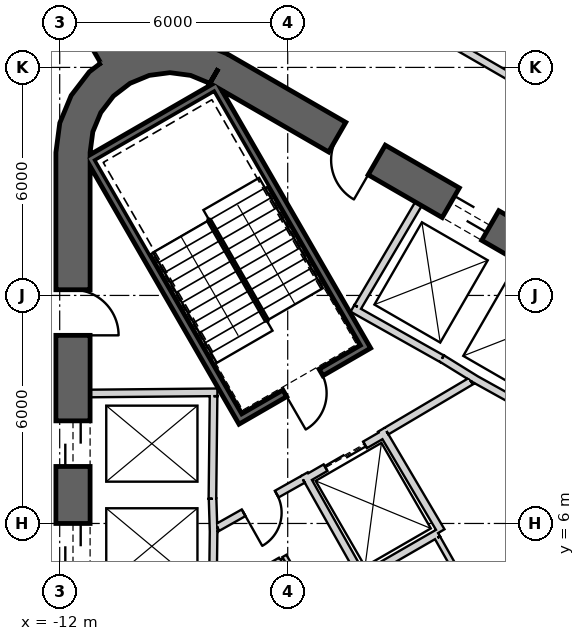
"""IFC4 building model, lengths in metres.
Left out: names, types, materials, properties, quantities, classifications, styles, units other than length and angle.
Written with IfcOpenShell. Run it as: python <this file> out.ifc"""

import sys

from ifc_helpers import new_model, si_unit, direction, frame, frame_2d, origin, place, context, subcontext, project, spatial, polyline, rectangle, outline, extrude, element, fill, save


model = new_model("IFC4")
c1 = context("Model", 3, precision=1e-05, world=origin(), true_north=direction((0.0, 1.0)))
c2 = subcontext(c1, "Body", "Model", "MODEL_VIEW")
j1 = project(units=[si_unit("LENGTHUNIT", "METRE"), si_unit("PLANEANGLEUNIT", "RADIAN")], contexts=[c1])
p1 = place(None, origin())
s1 = spatial("IfcSite", under=j1, at=p1, CompositionType="ELEMENT")
p2 = place(p1, origin())
s2 = spatial("IfcBuilding", under=s1, at=p2, CompositionType="ELEMENT")
p3 = place(p2, frame((0.0, 0.0, 82.4)))
s3 = spatial("IfcBuildingStorey", under=s2, at=p3, CompositionType="ELEMENT", Elevation=82.4)
p4 = place(p3, frame((19.475, 2.208, 0.0), z_axis=(0.0, 0.0, 1.0), x_axis=(-0.866028369851, 0.499994862586, 0.0)))
e1 = element("IfcWall", 1, at=p4, inside=s3, PredefinedType="SHEAR", context=c2, shape_type="SweptSolid", body=[
    extrude(rectangle(XDim=31.523, YDim=0.9, at=frame_2d((15.762, 0.0))), origin(), (0.0, 0.0, 1.0), 4.1),
])
p5 = place(p4, frame((7.062, 0.0, 0.0)))
e2 = element("IfcOpeningElement", 2, at=p5, cuts=e1, PredefinedType="OPENING", context=c2, shape_type="SweptSolid", body=[
    extrude(rectangle(XDim=1.2, YDim=2.4, at=frame_2d((0.6, 1.2))), frame((0.0, 0.46, 0.0), z_axis=(0.0, -1.0, 0.0), x_axis=(1.0, 0.0, 0.0)), (0.0, 0.0, 1.0), 0.92),
])
p6 = place(p4, frame((9.762, 0.0, 0.0)))
e3 = element("IfcOpeningElement", 3, at=p6, cuts=e1, PredefinedType="OPENING", context=c2, shape_type="SweptSolid", body=[
    extrude(rectangle(XDim=1.2, YDim=2.4, at=frame_2d((0.6, 1.2))), frame((0.0, 0.46, 0.0), z_axis=(0.0, -1.0, 0.0), x_axis=(1.0, 0.0, 0.0)), (0.0, 0.0, 1.0), 0.92),
])
p7 = place(p4, frame((12.462, 0.0, 0.0)))
e4 = element("IfcOpeningElement", 4, at=p7, cuts=e1, PredefinedType="OPENING", context=c2, shape_type="SweptSolid", body=[
    extrude(rectangle(XDim=1.2, YDim=2.4, at=frame_2d((0.6, 1.2))), frame((0.0, 0.46, 0.0), z_axis=(0.0, -1.0, 0.0), x_axis=(1.0, 0.0, 0.0)), (0.0, 0.0, 1.0), 0.92),
])
p8 = place(p4, frame((15.162, 0.0, 0.0)))
e5 = element("IfcOpeningElement", 5, at=p8, cuts=e1, PredefinedType="OPENING", context=c2, shape_type="SweptSolid", body=[
    extrude(rectangle(XDim=1.2, YDim=2.4, at=frame_2d((0.6, 1.2))), frame((0.0, 0.46, 0.0), z_axis=(0.0, -1.0, 0.0), x_axis=(1.0, 0.0, 0.0)), (0.0, 0.0, 1.0), 0.92),
])
p9 = place(p4, frame((17.862, 0.0, 0.0)))
e6 = element("IfcOpeningElement", 6, at=p9, cuts=e1, PredefinedType="OPENING", context=c2, shape_type="SweptSolid", body=[
    extrude(rectangle(XDim=1.2, YDim=2.4, at=frame_2d((0.6, 1.2))), frame((0.0, 0.46, 0.0), z_axis=(0.0, -1.0, 0.0), x_axis=(1.0, 0.0, 0.0)), (0.0, 0.0, 1.0), 0.92),
])
p10 = place(p4, frame((20.562, 0.0, 0.0)))
e7 = element("IfcOpeningElement", 7, at=p10, cuts=e1, PredefinedType="OPENING", context=c2, shape_type="SweptSolid", body=[
    extrude(rectangle(XDim=1.2, YDim=2.4, at=frame_2d((0.6, 1.2))), frame((0.0, 0.46, 0.0), z_axis=(0.0, -1.0, 0.0), x_axis=(1.0, 0.0, 0.0)), (0.0, 0.0, 1.0), 0.92),
])
p11 = place(p4, frame((23.262, 0.0, 0.0)))
e8 = element("IfcOpeningElement", 8, at=p11, cuts=e1, PredefinedType="OPENING", context=c2, shape_type="SweptSolid", body=[
    extrude(rectangle(XDim=1.2, YDim=2.4, at=frame_2d((0.6, 1.2))), frame((0.0, 0.46, 0.0), z_axis=(0.0, -1.0, 0.0), x_axis=(1.0, 0.0, 0.0)), (0.0, 0.0, 1.0), 0.92),
])
p12 = place(p4, frame((3.612, 0.0, 0.0)))
e9 = element("IfcOpeningElement", 9, at=p12, cuts=e1, PredefinedType="OPENING", context=c2, shape_type="SweptSolid", body=[
    extrude(rectangle(XDim=1.2, YDim=2.4, at=frame_2d((0.6, 1.2))), frame((0.0, 0.46, 0.0), z_axis=(0.0, -1.0, 0.0), x_axis=(1.0, 0.0, 0.0)), (0.0, 0.0, 1.0), 0.92),
])
p13 = place(p4, frame((26.712, 0.0, 0.0)))
e10 = element("IfcOpeningElement", 10, at=p13, cuts=e1, PredefinedType="OPENING", context=c2, shape_type="SweptSolid", body=[
    extrude(rectangle(XDim=1.2, YDim=2.4, at=frame_2d((0.6, 1.2))), frame((0.0, 0.46, 0.0), z_axis=(0.0, -1.0, 0.0), x_axis=(1.0, 0.0, 0.0)), (0.0, 0.0, 1.0), 0.92),
])
p14 = place(p3, frame((-11.65, 15.762, 0.0), z_axis=(0.0, 0.0, 1.0), x_axis=(0.0, -1.0, 0.0)))
e11 = element("IfcWall", 11, at=p14, inside=s3, PredefinedType="SHEAR", context=c2, shape_type="SweptSolid", body=[
    extrude(rectangle(XDim=31.523, YDim=0.9, at=frame_2d((15.762, 0.0))), origin(), (0.0, 0.0, 1.0), 4.1),
])
p15 = place(p14, frame((7.062, 0.0, 0.0)))
e12 = element("IfcOpeningElement", 12, at=p15, cuts=e11, PredefinedType="OPENING", context=c2, shape_type="SweptSolid", body=[
    extrude(rectangle(XDim=1.2, YDim=2.4, at=frame_2d((0.6, 1.2))), frame((0.0, 0.46, 0.0), z_axis=(0.0, -1.0, 0.0), x_axis=(1.0, 0.0, 0.0)), (0.0, 0.0, 1.0), 0.92),
])
p16 = place(p14, frame((9.762, 0.0, 0.0)))
e13 = element("IfcOpeningElement", 13, at=p16, cuts=e11, PredefinedType="OPENING", context=c2, shape_type="SweptSolid", body=[
    extrude(rectangle(XDim=1.2, YDim=2.4, at=frame_2d((0.6, 1.2))), frame((0.0, 0.46, 0.0), z_axis=(0.0, -1.0, 0.0), x_axis=(1.0, 0.0, 0.0)), (0.0, 0.0, 1.0), 0.92),
])
p17 = place(p14, frame((12.462, 0.0, 0.0)))
e14 = element("IfcOpeningElement", 14, at=p17, cuts=e11, PredefinedType="OPENING", context=c2, shape_type="SweptSolid", body=[
    extrude(rectangle(XDim=1.2, YDim=2.4, at=frame_2d((0.6, 1.2))), frame((0.0, 0.46, 0.0), z_axis=(0.0, -1.0, 0.0), x_axis=(1.0, 0.0, 0.0)), (0.0, 0.0, 1.0), 0.92),
])
p18 = place(p14, frame((15.162, 0.0, 0.0)))
e15 = element("IfcOpeningElement", 15, at=p18, cuts=e11, PredefinedType="OPENING", context=c2, shape_type="SweptSolid", body=[
    extrude(rectangle(XDim=1.2, YDim=2.4, at=frame_2d((0.6, 1.2))), frame((0.0, 0.46, 0.0), z_axis=(0.0, -1.0, 0.0), x_axis=(1.0, 0.0, 0.0)), (0.0, 0.0, 1.0), 0.92),
])
p19 = place(p14, frame((17.862, 0.0, 0.0)))
e16 = element("IfcOpeningElement", 16, at=p19, cuts=e11, PredefinedType="OPENING", context=c2, shape_type="SweptSolid", body=[
    extrude(rectangle(XDim=1.2, YDim=2.4, at=frame_2d((0.6, 1.2))), frame((0.0, 0.46, 0.0), z_axis=(0.0, -1.0, 0.0), x_axis=(1.0, 0.0, 0.0)), (0.0, 0.0, 1.0), 0.92),
])
p20 = place(p14, frame((20.562, 0.0, 0.0)))
e17 = element("IfcOpeningElement", 17, at=p20, cuts=e11, PredefinedType="OPENING", context=c2, shape_type="SweptSolid", body=[
    extrude(rectangle(XDim=1.2, YDim=2.4, at=frame_2d((0.6, 1.2))), frame((0.0, 0.46, 0.0), z_axis=(0.0, -1.0, 0.0), x_axis=(1.0, 0.0, 0.0)), (0.0, 0.0, 1.0), 0.92),
])
p21 = place(p14, frame((23.262, 0.0, 0.0)))
e18 = element("IfcOpeningElement", 18, at=p21, cuts=e11, PredefinedType="OPENING", context=c2, shape_type="SweptSolid", body=[
    extrude(rectangle(XDim=1.2, YDim=2.4, at=frame_2d((0.6, 1.2))), frame((0.0, 0.46, 0.0), z_axis=(0.0, -1.0, 0.0), x_axis=(1.0, 0.0, 0.0)), (0.0, 0.0, 1.0), 0.92),
])
p22 = place(p14, frame((3.612, 0.0, 0.0)))
e19 = element("IfcOpeningElement", 19, at=p22, cuts=e11, PredefinedType="OPENING", context=c2, shape_type="SweptSolid", body=[
    extrude(rectangle(XDim=1.2, YDim=2.4, at=frame_2d((0.6, 1.2))), frame((0.0, 0.46, 0.0), z_axis=(0.0, -1.0, 0.0), x_axis=(1.0, 0.0, 0.0)), (0.0, 0.0, 1.0), 0.92),
])
p23 = place(p14, frame((26.712, 0.0, 0.0)))
e20 = element("IfcOpeningElement", 20, at=p23, cuts=e11, PredefinedType="OPENING", context=c2, shape_type="SweptSolid", body=[
    extrude(rectangle(XDim=1.2, YDim=2.4, at=frame_2d((0.6, 1.2))), frame((0.0, 0.46, 0.0), z_axis=(0.0, -1.0, 0.0), x_axis=(1.0, 0.0, 0.0)), (0.0, 0.0, 1.0), 0.92),
])
p24 = place(p3, origin())
e21 = element("IfcWall", 21, at=p24, inside=s3, PredefinedType="SHEAR", context=c2, shape_type="SweptSolid", body=[
    extrude(outline(polyline([(-7.6, 18.36), (-8.323, 18.659), (-9.1, 18.762), (-9.876, 18.659), (-10.6, 18.36), (-11.221, 17.883), (-11.698, 17.262), (-11.998, 16.538), (-12.1, 15.762), (-11.2, 15.762), (-11.128, 16.305), (-10.919, 16.812), (-10.585, 17.247), (-10.15, 17.58), (-9.644, 17.79), (-9.1, 17.862), (-8.556, 17.79), (-8.05, 17.58), (-7.6, 18.36)])), origin(), (0.0, 0.0, 1.0), 4.1),
])
p25 = place(p3, frame((-10.575, 18.316, 0.0), z_axis=(0.0, 0.0, 1.0), x_axis=(-0.499995223427, 0.866028161523, 0.0)))
e22 = element("IfcWall", 22, at=p25, inside=s3, PredefinedType="SHEAR", context=c2, shape_type="SweptSolid", body=[
    extrude(rectangle(XDim=13.455, YDim=0.8, at=frame_2d((6.728, 0.0))), origin(), (0.0, 0.0, 1.0), 4.1),
])
p26 = place(p25, frame((0.7, 0.0, 0.0)))
e23 = element("IfcOpeningElement", 23, at=p26, cuts=e22, PredefinedType="OPENING", context=c2, shape_type="SweptSolid", body=[
    extrude(rectangle(XDim=1.4, YDim=2.4, at=frame_2d((0.7, 1.2))), frame((0.0, 0.41, 0.0), z_axis=(0.0, -1.0, 0.0), x_axis=(1.0, 0.0, 0.0)), (0.0, 0.0, 1.0), 0.82),
])
p27 = place(p3, frame((-11.2, 9.42, 0.0), z_axis=(0.0, 0.0, 1.0), x_axis=(0.999957167047, 0.009255488683, 0.0)))
e24 = element("IfcWall", 24, at=p27, inside=s3, PredefinedType="PLUMBINGWALL", context=c2, shape_type="SweptSolid", body=[
    extrude(rectangle(XDim=3.35, YDim=0.2, at=frame_2d((1.675, 0.0))), origin(), (0.0, 0.0, 1.0), 3.8),
])
p28 = place(p3, frame((-7.951, 9.35, 0.0), z_axis=(0.0, 0.0, 1.0), x_axis=(-0.011120469654, -0.999938165666, 0.0)))
e25 = element("IfcWall", 25, at=p28, inside=s3, PredefinedType="PLUMBINGWALL", context=c2, shape_type="SweptSolid", body=[
    extrude(rectangle(XDim=2.7, YDim=0.2, at=frame_2d((1.35, 0.0))), origin(), (0.0, 0.0, 1.0), 3.8),
])
p29 = place(p3, frame((-7.977, 6.65, 0.0), z_axis=(0.0, 0.0, 1.0), x_axis=(0.030861509705, -0.999523670164, 0.0)))
e26 = element("IfcWall", 26, at=p29, inside=s3, PredefinedType="PLUMBINGWALL", context=c2, shape_type="SweptSolid", body=[
    extrude(rectangle(XDim=0.878, YDim=0.2, at=frame_2d((0.439, 0.0))), origin(), (0.0, 0.0, 1.0), 3.8),
])
p30 = place(p3, frame((-7.949, 5.895, 0.0), z_axis=(0.0, 0.0, 1.0), x_axis=(-0.012042535896, -0.999927486035, 0.0)))
e27 = element("IfcWall", 27, at=p30, inside=s3, PredefinedType="PLUMBINGWALL", context=c2, shape_type="SweptSolid", body=[
    extrude(rectangle(XDim=1.845, YDim=0.2, at=frame_2d((0.922, 0.0))), origin(), (0.0, 0.0, 1.0), 3.8),
])
p31 = place(p3, frame((-1.941, 10.339, 0.0), z_axis=(0.0, 0.0, 1.0), x_axis=(0.850216889117, -0.526432561171, 0.0)))
e28 = element("IfcWall", 28, at=p31, inside=s3, PredefinedType="PLUMBINGWALL", context=c2, shape_type="SweptSolid", body=[
    extrude(rectangle(XDim=1.078, YDim=0.2, at=frame_2d((0.539, 0.0))), origin(), (0.0, 0.0, 1.0), 3.8),
])
p32 = place(p3, frame((0.483, 8.936, 0.0), z_axis=(0.0, 0.0, 1.0), x_axis=(-0.874269620932, 0.485440655401, 0.0)))
e29 = element("IfcWall", 29, at=p32, inside=s3, PredefinedType="PLUMBINGWALL", context=c2, shape_type="SweptSolid", body=[
    extrude(rectangle(XDim=1.845, YDim=0.2, at=frame_2d((0.922, 0.0))), origin(), (0.0, 0.0, 1.0), 3.8),
])
p33 = place(p3, frame((-4.296, 11.659, 0.0), z_axis=(0.0, 0.0, 1.0), x_axis=(0.871534483978, -0.490334215854, 0.0)))
e30 = element("IfcWall", 30, at=p33, inside=s3, PredefinedType="PLUMBINGWALL", context=c2, shape_type="SweptSolid", body=[
    extrude(rectangle(XDim=2.7, YDim=0.2, at=frame_2d((1.35, 0.0))), origin(), (0.0, 0.0, 1.0), 3.8),
])
p34 = place(p3, frame((-4.158, 11.696, 0.0), z_axis=(0.0, 0.0, 1.0), x_axis=(0.508018930956, 0.861345903683, 0.0)))
e31 = element("IfcWall", 31, at=p34, inside=s3, PredefinedType="PLUMBINGWALL", context=c2, shape_type="SweptSolid", body=[
    extrude(rectangle(XDim=3.15, YDim=0.2, at=frame_2d((1.575, 0.0))), origin(), (0.0, 0.0, 1.0), 3.8),
])
p35 = place(p3, frame((-11.245, 15.678, -0.3), z_axis=(0.0, 0.0, 1.0), x_axis=(0.499977274689, -0.866038523851, 0.0)))
e32 = element("IfcWall", 32, at=p35, inside=s3, PredefinedType="SHEAR", context=c2, shape_type="SweptSolid", body=[
    extrude(rectangle(XDim=8.1, YDim=0.2, at=frame_2d((4.05, 0.0))), origin(), (0.0, 0.0, 1.0), 4.1),
])
p36 = place(p3, frame((-7.818, 17.541, -0.3), z_axis=(0.0, 0.0, 1.0), x_axis=(-0.866044365799, -0.499967155389, 0.0)))
e33 = element("IfcWall", 33, at=p36, inside=s3, PredefinedType="SHEAR", context=c2, shape_type="SweptSolid", body=[
    extrude(rectangle(XDim=3.8, YDim=0.2, at=frame_2d((1.9, 0.0))), origin(), (0.0, 0.0, 1.0), 4.1),
])
p37 = place(p3, frame((-7.854, 17.405, -0.3), z_axis=(0.0, 0.0, 1.0), x_axis=(0.499997992926, -0.866026562566, 0.0)))
e34 = element("IfcWall", 34, at=p37, inside=s3, PredefinedType="SHEAR", context=c2, shape_type="SweptSolid", body=[
    extrude(rectangle(XDim=7.9, YDim=0.2, at=frame_2d((3.95, 0.0))), origin(), (0.0, 0.0, 1.0), 4.1),
])
p38 = place(p3, frame((-7.159, 8.8, -0.3), z_axis=(0.0, 0.0, 1.0), x_axis=(0.866047807691, 0.499961193289, 0.0)))
e35 = element("IfcWall", 35, at=p38, inside=s3, PredefinedType="SHEAR", context=c2, shape_type="SweptSolid", body=[
    extrude(rectangle(XDim=3.6, YDim=0.2, at=frame_2d((1.8, 0.0))), origin(), (0.0, 0.0, 1.0), 4.1),
])
p39 = place(p38, frame((1.25, 0.0, 0.3)))
e36 = element("IfcOpeningElement", 36, at=p39, cuts=e35, PredefinedType="OPENING", context=c2, shape_type="SweptSolid", body=[
    extrude(rectangle(XDim=1.1, YDim=2.1, at=frame_2d((0.55, 1.05))), frame((0.0, 0.11, 0.0), z_axis=(0.0, -1.0, 0.0), x_axis=(1.0, 0.0, 0.0)), (0.0, 0.0, 1.0), 0.22),
])
p40 = place(p3, frame((-5.524, 7.168, 0.0), z_axis=(0.0, 0.0, 1.0), x_axis=(0.866024647952, 0.500001309137, 0.0)))
e37 = element("IfcWall", 37, at=p40, inside=s3, PredefinedType="PLUMBINGWALL", context=c2, shape_type="SweptSolid", body=[
    extrude(rectangle(XDim=2.4, YDim=0.2, at=frame_2d((1.2, 0.0))), origin(), (0.0, 0.0, 1.0), 3.8),
])
p41 = place(p40, frame((0.6, 0.0, 0.0)))
e38 = element("IfcOpeningElement", 38, at=p41, cuts=e37, PredefinedType="OPENING", context=c2, shape_type="SweptSolid", body=[
    extrude(rectangle(XDim=1.2, YDim=2.4, at=frame_2d((0.6, 1.2))), frame((0.0, 0.11, 0.0), z_axis=(0.0, -1.0, 0.0), x_axis=(1.0, 0.0, 0.0)), (0.0, 0.0, 1.0), 0.22),
])
p42 = place(p3, frame((-3.538, 8.465, 0.0), z_axis=(0.0, 0.0, 1.0), x_axis=(0.508647062354, -0.860975125052, 0.0)))
e39 = element("IfcWall", 39, at=p42, inside=s3, PredefinedType="PLUMBINGWALL", context=c2, shape_type="SweptSolid", body=[
    extrude(rectangle(XDim=3.1, YDim=0.2, at=frame_2d((1.55, 0.0))), origin(), (0.0, 0.0, 1.0), 3.8),
])
p43 = place(p3, frame((-2.043, 5.748, 0.0), z_axis=(0.0, 0.0, 1.0), x_axis=(-0.866035096217, -0.499983211839, 0.0)))
e40 = element("IfcWall", 40, at=p43, inside=s3, PredefinedType="PLUMBINGWALL", context=c2, shape_type="SweptSolid", body=[
    extrude(rectangle(XDim=2.404, YDim=0.2, at=frame_2d((1.202, 0.0))), origin(), (0.0, 0.0, 1.0), 3.8),
])
p44 = place(p3, frame((-5.562, 7.296, 0.0), z_axis=(0.0, 0.0, 1.0), x_axis=(0.49134651263, -0.870964180966, 0.0)))
e41 = element("IfcWall", 41, at=p44, inside=s3, PredefinedType="PLUMBINGWALL", context=c2, shape_type="SweptSolid", body=[
    extrude(rectangle(XDim=3.0, YDim=0.2, at=frame_2d((1.5, 0.0))), origin(), (0.0, 0.0, 1.0), 3.8),
])
p45 = place(p3, frame((-1.18, 9.744, 0.0), z_axis=(0.0, 0.0, 1.0), x_axis=(-0.860615607571, -0.509255118781, 0.0)))
e42 = element("IfcWall", 42, at=p45, inside=s3, PredefinedType="PARTITIONING", context=c2, shape_type="SweptSolid", body=[
    extrude(rectangle(XDim=2.581, YDim=0.2, at=frame_2d((1.29, 0.0))), origin(), (0.0, 0.0, 1.0), 3.8),
])
p46 = place(p3, frame((-5.6, 7.16, 0.0), z_axis=(0.0, 0.0, 1.0), x_axis=(-0.871363259478, -0.490638431059, 0.0)))
e43 = element("IfcWall", 43, at=p46, inside=s3, PredefinedType="PARTITIONING", context=c2, shape_type="SweptSolid", body=[
    extrude(rectangle(XDim=2.581, YDim=0.2, at=frame_2d((1.291, 0.0))), origin(), (0.0, 0.0, 1.0), 3.8),
])
p47 = place(p46, frame((0.791, 0.0, 0.0)))
e44 = element("IfcOpeningElement", 44, at=p47, cuts=e43, PredefinedType="OPENING", context=c2, shape_type="SweptSolid", body=[
    extrude(rectangle(XDim=1.0, YDim=2.1, at=frame_2d((0.5, 1.05))), frame((0.0, 0.11, 0.0), z_axis=(0.0, -1.0, 0.0), x_axis=(1.0, 0.0, 0.0)), (0.0, 0.0, 1.0), 0.22),
])
p48 = place(p3, frame((-2.059, 5.624, 0.0), z_axis=(0.0, 0.0, 1.0), x_axis=(0.49265005812, -0.870227510617, 0.0)))
e45 = element("IfcWall", 45, at=p48, inside=s3, PredefinedType="PLUMBINGWALL", context=c2, shape_type="SweptSolid", body=[
    extrude(rectangle(XDim=3.365, YDim=0.15, at=frame_2d((1.683, 0.0))), origin(), (0.0, 0.0, 1.0), 3.8),
])
p49 = place(p3, frame((-6.231, 5.062, 0.0), z_axis=(0.0, 0.0, 1.0), x_axis=(0.0, -1.0, 0.0)))
e46 = element("IfcWall", 46, at=p49, inside=s3, PredefinedType="PARTITIONING", context=c2, shape_type="SweptSolid", body=[
    extrude(rectangle(XDim=10.125, YDim=0.12, at=frame_2d((5.062, 0.0))), origin(), (0.0, 0.0, 1.0), 3.8),
])
p50 = place(p3, frame((-6.201, 5.046, 0.0), z_axis=(0.0, 0.0, 1.0), x_axis=(-0.867071050325, -0.498184497639, 0.0)))
e47 = element("IfcWall", 47, at=p50, inside=s3, PredefinedType="PARTITIONING", context=c2, shape_type="SweptSolid", body=[
    extrude(rectangle(XDim=2.017, YDim=0.12, at=frame_2d((1.008, 0.0))), origin(), (0.0, 0.0, 1.0), 3.8),
])
p51 = place(p3, frame((-4.558, 2.495, 0.0), z_axis=(0.0, 0.0, 1.0), x_axis=(-0.499991792115, 0.866030142557, 0.0)))
e48 = element("IfcWall", 48, at=p51, inside=s3, PredefinedType="PARTITIONING", context=c2, shape_type="SweptSolid", body=[
    extrude(rectangle(XDim=3.06, YDim=0.12, at=frame_2d((1.53, 0.0))), origin(), (0.0, 0.0, 1.0), 3.8),
])
p52 = place(p3, frame((21.944, 4.998, 0.0), z_axis=(0.0, 0.0, 1.0), x_axis=(-0.866025615729, 0.499999632902, 0.0)))
e49 = element("IfcWall", 49, at=p52, inside=s3, PredefinedType="PARTITIONING", context=c2, shape_type="SweptSolid", body=[
    extrude(rectangle(XDim=32.811, YDim=0.2, at=frame_2d((16.405, 0.0))), origin(), (0.0, 0.0, 1.0), 2.98),
])
p53 = place(p52, frame((15.955, 0.0, 0.0)))
e50 = element("IfcOpeningElement", 50, at=p53, cuts=e49, PredefinedType="OPENING", context=c2, shape_type="SweptSolid", body=[
    extrude(rectangle(XDim=1.0, YDim=2.1, at=frame_2d((0.5, 1.05))), frame((0.0, 0.11, 0.0), z_axis=(0.0, -1.0, 0.0), x_axis=(1.0, 0.0, 0.0)), (0.0, 0.0, 1.0), 0.22),
])
p54 = place(p39, origin())
e51 = element("IfcDoor", 51, at=p54, inside=s3, OperationType="SINGLE_SWING_RIGHT", PredefinedType="USERDEFINED", context=c2, shape_type="SweptSolid", body=[
    extrude(rectangle(XDim=1.1, YDim=2.1, at=frame_2d((0.55, 1.05))), frame((0.0, 0.025, 0.0), z_axis=(0.0, -1.0, 0.0), x_axis=(1.0, 0.0, 0.0)), (0.0, 0.0, 1.0), 0.05),
])
fill(e36, e51)
p55 = place(p47, origin())
e52 = element("IfcDoor", 52, at=p55, inside=s3, OperationType="SINGLE_SWING_LEFT", PredefinedType="USERDEFINED", context=c2, shape_type="SweptSolid", body=[
    extrude(rectangle(XDim=1.0, YDim=2.1, at=frame_2d((0.5, 1.05))), frame((0.0, 0.025, 0.0), z_axis=(0.0, -1.0, 0.0), x_axis=(1.0, 0.0, 0.0)), (0.0, 0.0, 1.0), 0.05),
])
fill(e44, e52)
p56 = place(p41, origin())
e53 = element("IfcDoor", 53, at=p56, inside=s3, OperationType="SLIDING_TO_LEFT", PredefinedType="USERDEFINED", context=c2, shape_type="SweptSolid", body=[
    extrude(rectangle(XDim=1.2, YDim=2.4, at=frame_2d((0.6, 1.2))), frame((0.0, 0.025, 0.0), z_axis=(0.0, -1.0, 0.0), x_axis=(1.0, 0.0, 0.0)), (0.0, 0.0, 1.0), 0.05),
])
fill(e38, e53)
p57 = place(p15, origin())
e54 = element("IfcDoor", 54, at=p57, inside=s3, OperationType="SLIDING_TO_LEFT", PredefinedType="USERDEFINED", context=c2, shape_type="SweptSolid", body=[
    extrude(rectangle(XDim=1.2, YDim=2.4, at=frame_2d((0.6, 1.2))), frame((0.0, 0.025, 0.0), z_axis=(0.0, -1.0, 0.0), x_axis=(1.0, 0.0, 0.0)), (0.0, 0.0, 1.0), 0.05),
])
fill(e12, e54)
p58 = place(p16, origin())
e55 = element("IfcDoor", 55, at=p58, inside=s3, OperationType="SLIDING_TO_LEFT", PredefinedType="USERDEFINED", context=c2, shape_type="SweptSolid", body=[
    extrude(rectangle(XDim=1.2, YDim=2.4, at=frame_2d((0.6, 1.2))), frame((0.0, 0.025, 0.0), z_axis=(0.0, -1.0, 0.0), x_axis=(1.0, 0.0, 0.0)), (0.0, 0.0, 1.0), 0.05),
])
fill(e13, e55)
p59 = place(p11, origin())
e56 = element("IfcDoor", 56, at=p59, inside=s3, OperationType="SLIDING_TO_LEFT", PredefinedType="USERDEFINED", context=c2, shape_type="SweptSolid", body=[
    extrude(rectangle(XDim=1.2, YDim=2.4, at=frame_2d((0.6, 1.2))), frame((0.0, 0.025, 0.0), z_axis=(0.0, -1.0, 0.0), x_axis=(1.0, 0.0, 0.0)), (0.0, 0.0, 1.0), 0.05),
])
fill(e8, e56)
p60 = place(p13, origin())
e57 = element("IfcDoor", 57, at=p60, inside=s3, OperationType="SINGLE_SWING_LEFT", PredefinedType="USERDEFINED", context=c2, shape_type="SweptSolid", body=[
    extrude(rectangle(XDim=1.2, YDim=2.4, at=frame_2d((0.6, 1.2))), frame((0.0, 0.025, 0.0), z_axis=(0.0, -1.0, 0.0), x_axis=(1.0, 0.0, 0.0)), (0.0, 0.0, 1.0), 0.05),
])
fill(e10, e57)
p61 = place(p22, origin())
e58 = element("IfcDoor", 58, at=p61, inside=s3, OperationType="SINGLE_SWING_LEFT", PredefinedType="USERDEFINED", context=c2, shape_type="SweptSolid", body=[
    extrude(rectangle(XDim=1.2, YDim=2.4, at=frame_2d((0.6, 1.2))), frame((0.0, 0.025, 0.0), z_axis=(0.0, -1.0, 0.0), x_axis=(1.0, 0.0, 0.0)), (0.0, 0.0, 1.0), 0.05),
])
fill(e19, e58)
save(model, sys.argv[1])
